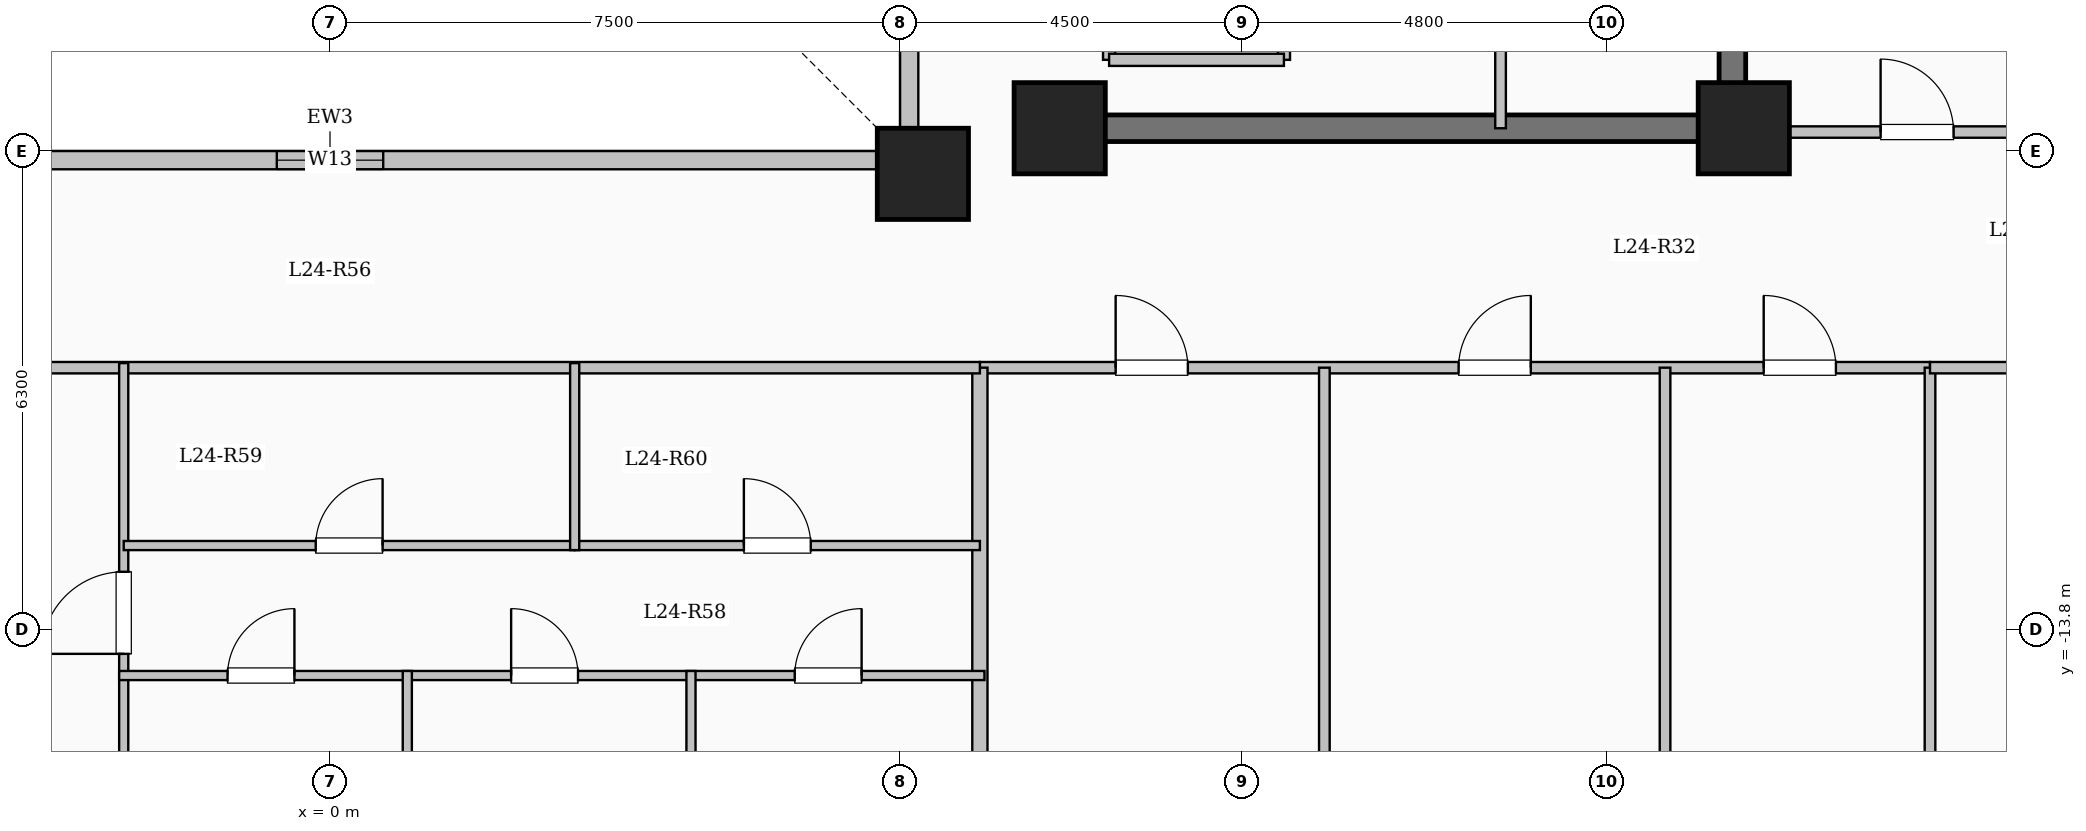
"""IFC4 building model, lengths in metres.
Left out: names, types, materials, properties, quantities, classifications, styles, units other than length and angle.
Written with IfcOpenShell. Run it as: python <this file> out.ifc"""

import sys

from ifc_helpers import new_model, si_unit, direction, frame, frame_2d, origin, origin_2d, place, context, subcontext, project, spatial, rectangle, extrude, element, fill, save


model = new_model("IFC4")
c1 = context("Model", 3, precision=1e-05, world=origin(), true_north=direction((0.0, 1.0)))
c2 = subcontext(c1, "Body", "Model", "MODEL_VIEW")
j1 = project(units=[si_unit("LENGTHUNIT", "METRE"), si_unit("PLANEANGLEUNIT", "RADIAN")], contexts=[c1])
p1 = place(None, origin())
s1 = spatial("IfcSite", under=j1, at=p1, CompositionType="ELEMENT")
p2 = place(p1, origin())
s2 = spatial("IfcBuilding", under=s1, at=p2, CompositionType="ELEMENT")
p3 = place(p2, frame((0.0, 0.0, 91.7)))
s3 = spatial("IfcBuildingStorey", under=s2, at=p3, CompositionType="ELEMENT", Elevation=91.7)
for number, where, z_axis, x_axis in (
    (1, (7.8, -7.8, 0.0), (0.0, 0.0, 1.0), (1.0, 0.0, 0.0)),
    (2, (9.6, -7.2, 0.0), (0.0, 0.0, 1.0), (1.0, 0.0, 0.0)),
    (3, (18.6, -7.2, 0.0), (0.0, 0.0, 1.0), (1.0, 0.0, 0.0)),
):
    element("IfcColumn", number, at=place(p3, frame(where, z_axis=z_axis, x_axis=x_axis)), inside=s3, PredefinedType="COLUMN", context=c2, shape_type="SweptSolid", body=[
        extrude(rectangle(XDim=1.2, YDim=1.2, at=origin_2d()), origin(), (0.0, 0.0, 1.0), 3.35),
    ])
p4 = place(p3, frame((-7.62, -7.62, 0.0), z_axis=(0.0, 0.0, 1.0), x_axis=(1.0, 0.0, 0.0)))
e4 = element("IfcWall", 4, at=p4, inside=s3, PredefinedType="SOLIDWALL", context=c2, shape_type="SweptSolid", body=[
    extrude(rectangle(XDim=15.24, YDim=0.24, at=frame_2d((7.62, 0.0))), origin(), (0.0, 0.0, 1.0), 3.1),
])
p5 = place(p4, frame((6.92, 0.0, 0.95)))
e5 = element("IfcOpeningElement", 5, at=p5, cuts=e4, PredefinedType="OPENING", context=c2, shape_type="SweptSolid", body=[
    extrude(rectangle(XDim=1.4, YDim=1.5, at=frame_2d((0.7, 0.75))), frame((0.0, 0.13, 0.0), z_axis=(0.0, -1.0, 0.0), x_axis=(1.0, 0.0, 0.0)), (0.0, 0.0, 1.0), 0.26),
])
p6 = place(p3, frame((7.62, -7.62, 0.0), z_axis=(0.0, 0.0, 1.0), x_axis=(0.0, 1.0, 0.0)))
e6 = element("IfcWall", 6, at=p6, inside=s3, PredefinedType="SOLIDWALL", context=c2, shape_type="SweptSolid", body=[
    extrude(rectangle(XDim=15.24, YDim=0.24, at=frame_2d((7.62, 0.0))), origin(), (0.0, 0.0, 1.0), 3.1),
])
p7 = place(p6, frame((6.92, 0.0, 0.95)))
e7 = element("IfcOpeningElement", 7, at=p7, cuts=e6, PredefinedType="OPENING", context=c2, shape_type="SweptSolid", body=[
    extrude(rectangle(XDim=1.4, YDim=1.5, at=frame_2d((0.7, 0.75))), frame((0.0, 0.13, 0.0), z_axis=(0.0, -1.0, 0.0), x_axis=(1.0, 0.0, 0.0)), (0.0, 0.0, 1.0), 0.26),
])
p8 = place(p3, frame((10.25, -6.3, 0.0), z_axis=(0.0, 0.0, 1.0), x_axis=(0.0, 1.0, 0.0)))
e8 = element("IfcWall", 8, at=p8, inside=s3, PredefinedType="SOLIDWALL", context=c2, shape_type="SweptSolid", body=[
    extrude(rectangle(XDim=2.6, YDim=0.16, at=frame_2d((1.3, 0.0))), origin(), (0.0, 0.0, 1.0), 3.1),
])
p9 = place(p8, frame((0.75, 0.0, 0.0)))
e9 = element("IfcOpeningElement", 9, at=p9, cuts=e8, PredefinedType="OPENING", context=c2, shape_type="SweptSolid", body=[
    extrude(rectangle(XDim=1.1, YDim=2.15, at=frame_2d((0.55, 1.075))), frame((0.0, 0.09, 0.0), z_axis=(0.0, -1.0, 0.0), x_axis=(1.0, 0.0, 0.0)), (0.0, 0.0, 1.0), 0.18),
])
p10 = place(p3, frame((12.55, -6.3, 0.0), z_axis=(0.0, 0.0, 1.0), x_axis=(0.0, 1.0, 0.0)))
e10 = element("IfcWall", 10, at=p10, inside=s3, PredefinedType="SOLIDWALL", context=c2, shape_type="SweptSolid", body=[
    extrude(rectangle(XDim=2.6, YDim=0.16, at=frame_2d((1.3, 0.0))), origin(), (0.0, 0.0, 1.0), 3.1),
])
p11 = place(p3, frame((10.25, -6.3, 0.0), z_axis=(0.0, 0.0, 1.0), x_axis=(1.0, 0.0, 0.0)))
e11 = element("IfcWall", 11, at=p11, inside=s3, PredefinedType="SOLIDWALL", context=c2, shape_type="SweptSolid", body=[
    extrude(rectangle(XDim=2.3, YDim=0.16, at=frame_2d((1.15, 0.0))), origin(), (0.0, 0.0, 1.0), 3.1),
])
p12 = place(p3, frame((18.45, -7.375, 0.0), z_axis=(0.0, 0.0, 1.0), x_axis=(0.0, 1.0, 0.0)))
e12 = element("IfcWall", 12, at=p12, inside=s3, PredefinedType="SHEAR", context=c2, shape_type="SweptSolid", body=[
    extrude(rectangle(XDim=14.05, YDim=0.35, at=frame_2d((7.025, 0.0))), origin(), (0.0, 0.0, 1.0), 3.35),
])
p13 = place(p3, frame((10.075, -7.2, 0.0), z_axis=(0.0, 0.0, 1.0), x_axis=(1.0, 0.0, 0.0)))
e13 = element("IfcWall", 13, at=p13, inside=s3, PredefinedType="SHEAR", context=c2, shape_type="SweptSolid", body=[
    extrude(rectangle(XDim=8.55, YDim=0.35, at=frame_2d((4.275, 0.0))), origin(), (0.0, 0.0, 1.0), 3.35),
])
p14 = place(p3, frame((15.4, -7.2, 0.0), z_axis=(0.0, 0.0, 1.0), x_axis=(0.0, 1.0, 0.0)))
e14 = element("IfcWall", 14, at=p14, inside=s3, PredefinedType="PARTITIONING", context=c2, shape_type="SweptSolid", body=[
    extrude(rectangle(XDim=10.45, YDim=0.14, at=frame_2d((5.225, 0.0))), origin(), (0.0, 0.0, 1.0), 3.1),
])
p15 = place(p14, frame((9.25, 0.0, 0.0)))
e15 = element("IfcOpeningElement", 15, at=p15, cuts=e14, PredefinedType="OPENING", context=c2, shape_type="SweptSolid", body=[
    extrude(rectangle(XDim=0.9, YDim=2.08, at=frame_2d((0.45, 1.04))), frame((0.0, 0.08, 0.0), z_axis=(0.0, -1.0, 0.0), x_axis=(1.0, 0.0, 0.0)), (0.0, 0.0, 1.0), 0.16),
])
p16 = place(p3, frame((8.55, -10.35, 0.0), z_axis=(0.0, 0.0, 1.0), x_axis=(1.0, 0.0, 0.0)))
e16 = element("IfcWall", 16, at=p16, inside=s3, PredefinedType="PARTITIONING", context=c2, shape_type="SweptSolid", body=[
    extrude(rectangle(XDim=12.5, YDim=0.15, at=frame_2d((6.25, 0.0))), origin(), (0.0, 0.0, 1.0), 3.1),
])
p17 = place(p16, frame((1.786, 0.0, 0.0)))
e17 = element("IfcOpeningElement", 17, at=p17, cuts=e16, PredefinedType="OPENING", context=c2, shape_type="SweptSolid", body=[
    extrude(rectangle(XDim=0.95, YDim=2.15, at=frame_2d((0.475, 1.075))), frame((0.0, 0.085, 0.0), z_axis=(0.0, -1.0, 0.0), x_axis=(1.0, 0.0, 0.0)), (0.0, 0.0, 1.0), 0.17),
])
p18 = place(p16, frame((6.298, 0.0, 0.0)))
e18 = element("IfcOpeningElement", 18, at=p18, cuts=e16, PredefinedType="OPENING", context=c2, shape_type="SweptSolid", body=[
    extrude(rectangle(XDim=0.95, YDim=2.15, at=frame_2d((0.475, 1.075))), frame((0.0, 0.085, 0.0), z_axis=(0.0, -1.0, 0.0), x_axis=(1.0, 0.0, 0.0)), (0.0, 0.0, 1.0), 0.17),
])
p19 = place(p16, frame((10.312, 0.0, 0.0)))
e19 = element("IfcOpeningElement", 19, at=p19, cuts=e16, PredefinedType="OPENING", context=c2, shape_type="SweptSolid", body=[
    extrude(rectangle(XDim=0.95, YDim=2.15, at=frame_2d((0.475, 1.075))), frame((0.0, 0.085, 0.0), z_axis=(0.0, -1.0, 0.0), x_axis=(1.0, 0.0, 0.0)), (0.0, 0.0, 1.0), 0.17),
])
for number, where, z_axis, x_axis in (
    (20, (13.082, -22.05, 0.0), (0.0, 0.0, 1.0), (0.0, 1.0, 0.0)),
    (21, (17.564, -22.05, 0.0), (0.0, 0.0, 1.0), (0.0, 1.0, 0.0)),
):
    element("IfcWall", number, at=place(p3, frame(where, z_axis=z_axis, x_axis=x_axis)), inside=s3, PredefinedType="PARTITIONING", context=c2, shape_type="SweptSolid", body=[
        extrude(rectangle(XDim=11.7, YDim=0.14, at=frame_2d((5.85, 0.0))), origin(), (0.0, 0.0, 1.0), 3.1),
    ])
p20 = place(p3, frame((8.55, -22.704, 0.0), z_axis=(0.0, 0.0, 1.0), x_axis=(0.0, 1.0, 0.0)))
e22 = element("IfcWall", 22, at=p20, inside=s3, PredefinedType="SOLIDWALL", context=c2, shape_type="SweptSolid", body=[
    extrude(rectangle(XDim=12.354, YDim=0.2, at=frame_2d((6.177, 0.0))), origin(), (0.0, 0.0, 1.0), 3.1),
])
p21 = place(p3, frame((-8.55, -10.35, 0.0), z_axis=(0.0, 0.0, 1.0), x_axis=(1.0, 0.0, 0.0)))
e23 = element("IfcWall", 23, at=p21, inside=s3, PredefinedType="PARTITIONING", context=c2, shape_type="SweptSolid", body=[
    extrude(rectangle(XDim=17.1, YDim=0.15, at=frame_2d((8.55, 0.0))), origin(), (0.0, 0.0, 1.0), 3.1),
])
p22 = place(p21, frame((1.6, 0.0, 0.0)))
e24 = element("IfcOpeningElement", 24, at=p22, cuts=e23, PredefinedType="OPENING", context=c2, shape_type="SweptSolid", body=[
    extrude(rectangle(XDim=0.96, YDim=2.15, at=frame_2d((0.48, 1.075))), frame((0.0, 0.085, 0.0), z_axis=(0.0, -1.0, 0.0), x_axis=(1.0, 0.0, 0.0)), (0.0, 0.0, 1.0), 0.17),
])
p23 = place(p3, frame((-2.714, -23.58, 0.0), z_axis=(0.0, 0.0, 1.0), x_axis=(0.0, 1.0, 0.0)))
e25 = element("IfcWall", 25, at=p23, inside=s3, PredefinedType="PARTITIONING", context=c2, shape_type="SweptSolid", body=[
    extrude(rectangle(XDim=13.29, YDim=0.12, at=frame_2d((6.645, 0.0))), origin(), (0.0, 0.0, 1.0), 3.1),
])
p24 = place(p23, frame((9.465, 0.0, 0.0)))
e26 = element("IfcOpeningElement", 26, at=p24, cuts=e25, PredefinedType="OPENING", context=c2, shape_type="SweptSolid", body=[
    extrude(rectangle(XDim=1.08, YDim=2.15, at=frame_2d((0.54, 1.075))), frame((0.0, 0.07, 0.0), z_axis=(0.0, -1.0, 0.0), x_axis=(1.0, 0.0, 0.0)), (0.0, 0.0, 1.0), 0.14),
])
p25 = place(p3, frame((-2.714, -12.69, 0.0), z_axis=(0.0, 0.0, 1.0), x_axis=(1.0, 0.0, 0.0)))
e27 = element("IfcWall", 27, at=p25, inside=s3, PredefinedType="PARTITIONING", context=c2, shape_type="SweptSolid", body=[
    extrude(rectangle(XDim=5.933, YDim=0.12, at=frame_2d((2.967, 0.0))), origin(), (0.0, 0.0, 1.0), 2.635),
])
p26 = place(p25, frame((2.526, 0.0, 0.0)))
e28 = element("IfcOpeningElement", 28, at=p26, cuts=e27, PredefinedType="OPENING", context=c2, shape_type="SweptSolid", body=[
    extrude(rectangle(XDim=0.88, YDim=2.1, at=frame_2d((0.44, 1.05))), frame((0.0, 0.07, 0.0), z_axis=(0.0, -1.0, 0.0), x_axis=(1.0, 0.0, 0.0)), (0.0, 0.0, 1.0), 0.14),
])
p27 = place(p3, frame((3.219, -12.69, 0.0), z_axis=(0.0, 0.0, 1.0), x_axis=(1.0, 0.0, 0.0)))
e29 = element("IfcWall", 29, at=p27, inside=s3, PredefinedType="PARTITIONING", context=c2, shape_type="SweptSolid", body=[
    extrude(rectangle(XDim=5.331, YDim=0.12, at=frame_2d((2.666, 0.0))), origin(), (0.0, 0.0, 1.0), 2.635),
])
p28 = place(p27, frame((2.226, 0.0, 0.0)))
e30 = element("IfcOpeningElement", 30, at=p28, cuts=e29, PredefinedType="OPENING", context=c2, shape_type="SweptSolid", body=[
    extrude(rectangle(XDim=0.88, YDim=2.1, at=frame_2d((0.44, 1.05))), frame((0.0, 0.07, 0.0), z_axis=(0.0, -1.0, 0.0), x_axis=(1.0, 0.0, 0.0)), (0.0, 0.0, 1.0), 0.14),
])
p29 = place(p3, frame((-2.774, -14.4, 0.0), z_axis=(0.0, 0.0, 1.0), x_axis=(1.0, 0.0, 0.0)))
e31 = element("IfcWall", 31, at=p29, inside=s3, PredefinedType="PARTITIONING", context=c2, shape_type="SweptSolid", body=[
    extrude(rectangle(XDim=11.384, YDim=0.12, at=frame_2d((5.692, 0.0))), origin(), (0.0, 0.0, 1.0), 2.635),
])
p30 = place(p29, frame((1.426, 0.0, 0.0)))
e32 = element("IfcOpeningElement", 32, at=p30, cuts=e31, PredefinedType="OPENING", context=c2, shape_type="SweptSolid", body=[
    extrude(rectangle(XDim=0.88, YDim=2.1, at=frame_2d((0.44, 1.05))), frame((0.0, 0.07, 0.0), z_axis=(0.0, -1.0, 0.0), x_axis=(1.0, 0.0, 0.0)), (0.0, 0.0, 1.0), 0.14),
])
p31 = place(p29, frame((5.157, 0.0, 0.0)))
e33 = element("IfcOpeningElement", 33, at=p31, cuts=e31, PredefinedType="OPENING", context=c2, shape_type="SweptSolid", body=[
    extrude(rectangle(XDim=0.88, YDim=2.1, at=frame_2d((0.44, 1.05))), frame((0.0, 0.07, 0.0), z_axis=(0.0, -1.0, 0.0), x_axis=(1.0, 0.0, 0.0)), (0.0, 0.0, 1.0), 0.14),
])
p32 = place(p29, frame((8.888, 0.0, 0.0)))
e34 = element("IfcOpeningElement", 34, at=p32, cuts=e31, PredefinedType="OPENING", context=c2, shape_type="SweptSolid", body=[
    extrude(rectangle(XDim=0.88, YDim=2.1, at=frame_2d((0.44, 1.05))), frame((0.0, 0.07, 0.0), z_axis=(0.0, -1.0, 0.0), x_axis=(1.0, 0.0, 0.0)), (0.0, 0.0, 1.0), 0.14),
])
p33 = place(p3, frame((3.219, -12.75, 0.0), z_axis=(0.0, 0.0, 1.0), x_axis=(0.0, 1.0, 0.0)))
e35 = element("IfcWall", 35, at=p33, inside=s3, PredefinedType="PARTITIONING", context=c2, shape_type="SweptSolid", body=[
    extrude(rectangle(XDim=2.46, YDim=0.12, at=frame_2d((1.23, 0.0))), origin(), (0.0, 0.0, 1.0), 3.1),
])
for number, where, z_axis, x_axis in (
    (36, (1.017, -23.58, 0.0), (0.0, 0.0, 1.0), (0.0, 1.0, 0.0)),
    (37, (4.749, -23.58, 0.0), (0.0, 0.0, 1.0), (0.0, 1.0, 0.0)),
):
    element("IfcWall", number, at=place(p3, frame(where, z_axis=z_axis, x_axis=x_axis)), inside=s3, PredefinedType="PARTITIONING", context=c2, shape_type="SweptSolid", body=[
        extrude(rectangle(XDim=9.24, YDim=0.12, at=frame_2d((4.62, 0.0))), origin(), (0.0, 0.0, 1.0), 3.1),
    ])
p34 = place(p3, frame((18.45, -7.25, 0.0), z_axis=(0.0, 0.0, 1.0), x_axis=(1.0, 0.0, 0.0)))
e38 = element("IfcWall", 38, at=p34, inside=s3, PredefinedType="PARTITIONING", context=c2, shape_type="SweptSolid", body=[
    extrude(rectangle(XDim=8.43, YDim=0.15, at=frame_2d((4.215, 0.0))), origin(), (0.0, 0.0, 1.0), 3.1),
])
p35 = place(p34, frame((1.95, 0.0, 0.0)))
e39 = element("IfcOpeningElement", 39, at=p35, cuts=e38, PredefinedType="OPENING", context=c2, shape_type="SweptSolid", body=[
    extrude(rectangle(XDim=0.96, YDim=2.15, at=frame_2d((0.48, 1.075))), frame((0.0, 0.085, 0.0), z_axis=(0.0, -1.0, 0.0), x_axis=(1.0, 0.0, 0.0)), (0.0, 0.0, 1.0), 0.17),
])
p36 = place(p3, frame((21.05, -17.85, 0.0), z_axis=(0.0, 0.0, 1.0), x_axis=(0.0, 1.0, 0.0)))
e40 = element("IfcWall", 40, at=p36, inside=s3, PredefinedType="PARTITIONING", context=c2, shape_type="SweptSolid", body=[
    extrude(rectangle(XDim=7.5, YDim=0.14, at=frame_2d((3.75, 0.0))), origin(), (0.0, 0.0, 1.0), 3.1),
])
p37 = place(p3, frame((21.05, -10.35, 0.0), z_axis=(0.0, 0.0, 1.0), x_axis=(1.0, 0.0, 0.0)))
e41 = element("IfcWall", 41, at=p37, inside=s3, PredefinedType="PARTITIONING", context=c2, shape_type="SweptSolid", body=[
    extrude(rectangle(XDim=5.83, YDim=0.15, at=frame_2d((2.915, 0.0))), origin(), (0.0, 0.0, 1.0), 3.1),
])
p38 = place(p37, frame((2.44, 0.0, 0.0)))
e42 = element("IfcOpeningElement", 42, at=p38, cuts=e41, PredefinedType="OPENING", context=c2, shape_type="SweptSolid", body=[
    extrude(rectangle(XDim=0.95, YDim=2.15, at=frame_2d((0.475, 1.075))), frame((0.0, 0.085, 0.0), z_axis=(0.0, -1.0, 0.0), x_axis=(1.0, 0.0, 0.0)), (0.0, 0.0, 1.0), 0.17),
])
p39 = place(p5, origin())
e43 = element("IfcWindow", 43, at=p39, inside=s3, PartitioningType="SINGLE_PANEL", PredefinedType="WINDOW", context=c2, shape_type="SweptSolid", body=[
    extrude(rectangle(XDim=1.4, YDim=1.5, at=frame_2d((0.7, 0.75))), frame((0.0, 0.03, 0.0), z_axis=(0.0, -1.0, 0.0), x_axis=(1.0, 0.0, 0.0)), (0.0, 0.0, 1.0), 0.06),
])
fill(e5, e43)
p40 = place(p17, origin())
e44 = element("IfcDoor", 44, at=p40, inside=s3, OperationType="SINGLE_SWING_LEFT", PredefinedType="DOOR", context=c2, shape_type="SweptSolid", body=[
    extrude(rectangle(XDim=0.95, YDim=2.15, at=frame_2d((0.475, 1.075))), frame((0.0, 0.025, 0.0), z_axis=(0.0, -1.0, 0.0), x_axis=(1.0, 0.0, 0.0)), (0.0, 0.0, 1.0), 0.05),
])
fill(e17, e44)
p41 = place(p18, origin())
e45 = element("IfcDoor", 45, at=p41, inside=s3, OperationType="SINGLE_SWING_RIGHT", PredefinedType="DOOR", context=c2, shape_type="SweptSolid", body=[
    extrude(rectangle(XDim=0.95, YDim=2.15, at=frame_2d((0.475, 1.075))), frame((0.0, 0.025, 0.0), z_axis=(0.0, -1.0, 0.0), x_axis=(1.0, 0.0, 0.0)), (0.0, 0.0, 1.0), 0.05),
])
fill(e18, e45)
p42 = place(p19, origin())
e46 = element("IfcDoor", 46, at=p42, inside=s3, OperationType="SINGLE_SWING_LEFT", PredefinedType="DOOR", context=c2, shape_type="SweptSolid", body=[
    extrude(rectangle(XDim=0.95, YDim=2.15, at=frame_2d((0.475, 1.075))), frame((0.0, 0.025, 0.0), z_axis=(0.0, -1.0, 0.0), x_axis=(1.0, 0.0, 0.0)), (0.0, 0.0, 1.0), 0.05),
])
fill(e19, e46)
p43 = place(p24, origin())
e47 = element("IfcDoor", 47, at=p43, inside=s3, OperationType="SINGLE_SWING_LEFT", PredefinedType="DOOR", context=c2, shape_type="SweptSolid", body=[
    extrude(rectangle(XDim=1.08, YDim=2.15, at=frame_2d((0.54, 1.075))), frame((0.0, 0.025, 0.0), z_axis=(0.0, -1.0, 0.0), x_axis=(1.0, 0.0, 0.0)), (0.0, 0.0, 1.0), 0.05),
])
fill(e26, e47)
p44 = place(p26, origin())
e48 = element("IfcDoor", 48, at=p44, inside=s3, OperationType="SINGLE_SWING_RIGHT", PredefinedType="DOOR", context=c2, shape_type="SweptSolid", body=[
    extrude(rectangle(XDim=0.88, YDim=2.1, at=frame_2d((0.44, 1.05))), frame((0.0, 0.025, 0.0), z_axis=(0.0, -1.0, 0.0), x_axis=(1.0, 0.0, 0.0)), (0.0, 0.0, 1.0), 0.05),
])
fill(e28, e48)
p45 = place(p28, origin())
e49 = element("IfcDoor", 49, at=p45, inside=s3, OperationType="SINGLE_SWING_LEFT", PredefinedType="DOOR", context=c2, shape_type="SweptSolid", body=[
    extrude(rectangle(XDim=0.88, YDim=2.1, at=frame_2d((0.44, 1.05))), frame((0.0, 0.025, 0.0), z_axis=(0.0, -1.0, 0.0), x_axis=(1.0, 0.0, 0.0)), (0.0, 0.0, 1.0), 0.05),
])
fill(e30, e49)
p46 = place(p30, origin())
e50 = element("IfcDoor", 50, at=p46, inside=s3, OperationType="SINGLE_SWING_RIGHT", PredefinedType="DOOR", context=c2, shape_type="SweptSolid", body=[
    extrude(rectangle(XDim=0.88, YDim=2.1, at=frame_2d((0.44, 1.05))), frame((0.0, 0.025, 0.0), z_axis=(0.0, -1.0, 0.0), x_axis=(1.0, 0.0, 0.0)), (0.0, 0.0, 1.0), 0.05),
])
fill(e32, e50)
p47 = place(p31, origin())
e51 = element("IfcDoor", 51, at=p47, inside=s3, OperationType="SINGLE_SWING_LEFT", PredefinedType="DOOR", context=c2, shape_type="SweptSolid", body=[
    extrude(rectangle(XDim=0.88, YDim=2.1, at=frame_2d((0.44, 1.05))), frame((0.0, 0.025, 0.0), z_axis=(0.0, -1.0, 0.0), x_axis=(1.0, 0.0, 0.0)), (0.0, 0.0, 1.0), 0.05),
])
fill(e33, e51)
p48 = place(p32, origin())
e52 = element("IfcDoor", 52, at=p48, inside=s3, OperationType="SINGLE_SWING_RIGHT", PredefinedType="DOOR", context=c2, shape_type="SweptSolid", body=[
    extrude(rectangle(XDim=0.88, YDim=2.1, at=frame_2d((0.44, 1.05))), frame((0.0, 0.025, 0.0), z_axis=(0.0, -1.0, 0.0), x_axis=(1.0, 0.0, 0.0)), (0.0, 0.0, 1.0), 0.05),
])
fill(e34, e52)
p49 = place(p35, origin())
e53 = element("IfcDoor", 53, at=p49, inside=s3, OperationType="SINGLE_SWING_LEFT", PredefinedType="DOOR", context=c2, shape_type="SweptSolid", body=[
    extrude(rectangle(XDim=0.96, YDim=2.15, at=frame_2d((0.48, 1.075))), frame((0.0, 0.025, 0.0), z_axis=(0.0, -1.0, 0.0), x_axis=(1.0, 0.0, 0.0)), (0.0, 0.0, 1.0), 0.05),
])
fill(e39, e53)
save(model, sys.argv[1])
